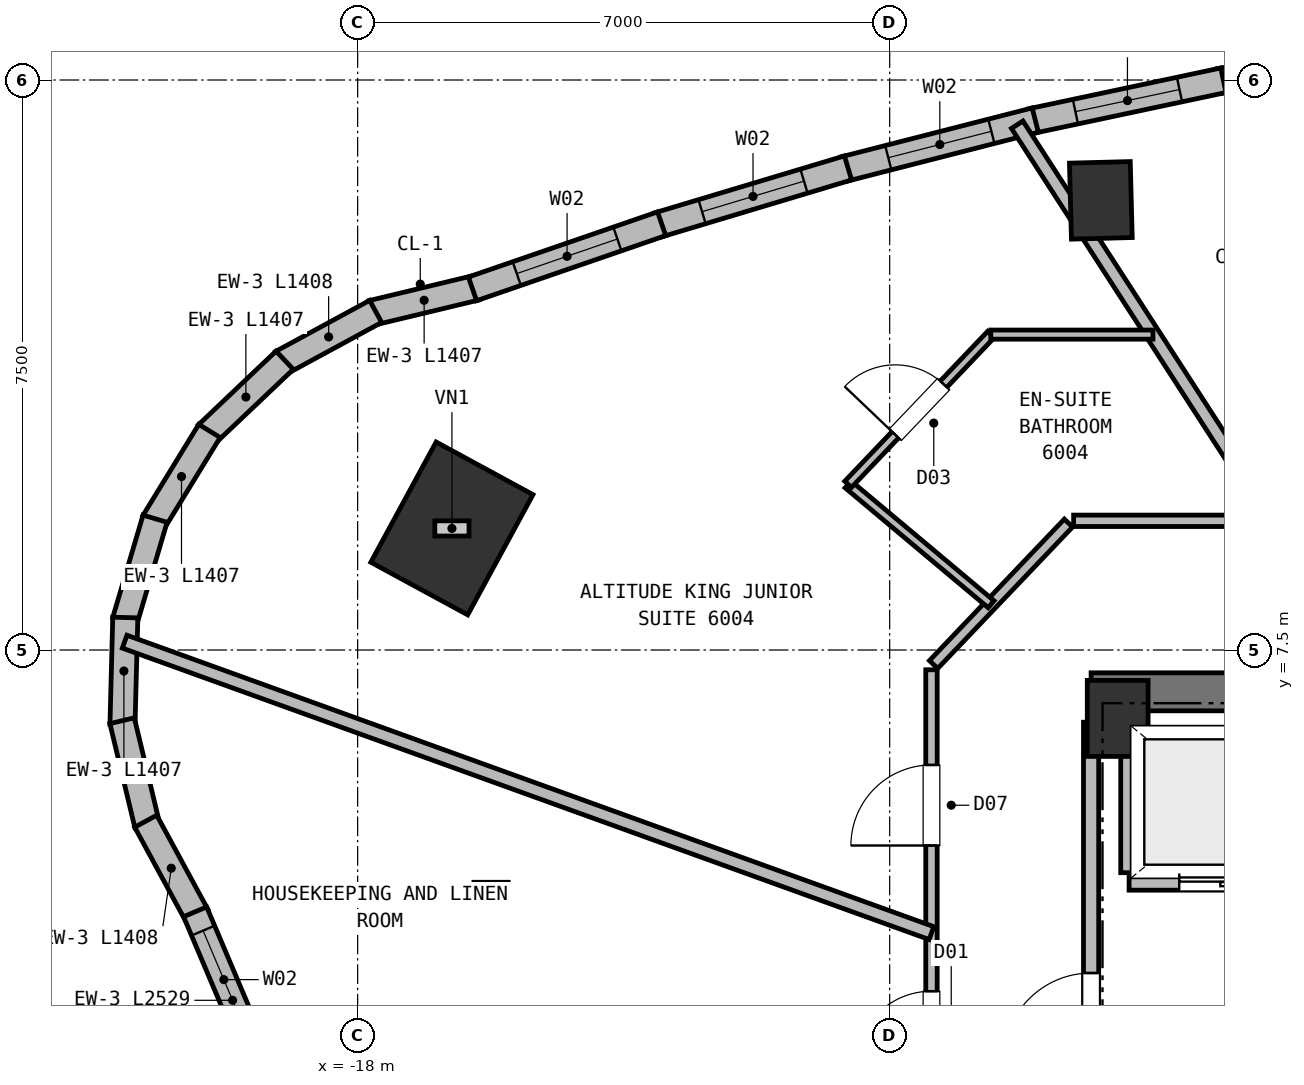
"""IFC4 building model, lengths in metres.
Left out: names, types, materials, properties, quantities, classifications, styles, units other than length and angle.
Written with IfcOpenShell. Run it as: python <this file> out.ifc"""

import sys

from ifc_helpers import new_model, si_unit, direction, frame, frame_2d, origin, origin_2d, place, context, subcontext, project, spatial, rectangle, extrude, element, fill, save


model = new_model("IFC4")
c1 = context("Model", 3, precision=1e-05, world=origin(), true_north=direction((0.0, 1.0)))
c2 = subcontext(c1, "Body", "Model", "MODEL_VIEW")
j1 = project(units=[si_unit("LENGTHUNIT", "METRE"), si_unit("PLANEANGLEUNIT", "RADIAN")], contexts=[c1])
p1 = place(None, origin())
s1 = spatial("IfcSite", under=j1, at=p1, CompositionType="ELEMENT")
p2 = place(p1, origin())
s2 = spatial("IfcBuilding", under=s1, at=p2, CompositionType="ELEMENT")
p3 = place(p2, frame((0.0, 0.0, 228.35)))
s3 = spatial("IfcBuildingStorey", under=s2, at=p3, CompositionType="ELEMENT", Elevation=228.35)
p4 = place(p3, frame((-8.0, 6.6, 0.0), z_axis=(0.0, 0.0, 1.0), x_axis=(1.0, 0.0, 0.0)))
e1 = element("IfcColumn", 1, at=p4, inside=s3, PredefinedType="COLUMN", context=c2, shape_type="SweptSolid", body=[
    extrude(rectangle(XDim=0.8, YDim=1.0, at=origin_2d()), origin(), (0.0, 0.0, 1.0), 3.8),
])
p5 = place(p3, frame((-8.35, 6.95, 0.0), z_axis=(0.0, 0.0, 1.0), x_axis=(1.0, 0.0, 0.0)))
e2 = element("IfcWall", 2, at=p5, inside=s3, PredefinedType="SHEAR", context=c2, shape_type="SweptSolid", body=[
    extrude(rectangle(XDim=16.7, YDim=0.5, at=frame_2d((8.35, 0.0))), origin(), (0.0, 0.0, 1.0), 3.55),
])
p6 = place(p3, frame((-16.76, 9.1, 0.0), z_axis=(0.0, 0.0, 1.0), x_axis=(-0.878817112662, 0.47715876026, 0.0)))
e3 = element("IfcColumn", 3, at=p6, inside=s3, PredefinedType="COLUMN", context=c2, shape_type="SweptSolid", body=[
    extrude(rectangle(XDim=1.45, YDim=1.8, at=origin_2d()), origin(), (0.0, 0.0, 1.0), 3.8),
])
p7 = place(p3, frame((-8.222, 13.417, 0.0), z_axis=(0.0, 0.0, 1.0), x_axis=(0.999657324976, 0.026176948308, 0.0)))
e4 = element("IfcColumn", 4, at=p7, inside=s3, PredefinedType="COLUMN", context=c2, shape_type="SweptSolid", body=[
    extrude(rectangle(XDim=0.8, YDim=1.0, at=origin_2d()), origin(), (0.0, 0.0, 1.0), 3.8),
])
p8 = place(p3, frame((-17.809, 11.938, 0.0), z_axis=(0.0, 0.0, 1.0), x_axis=(0.972355799013, 0.23350417582, 0.0)))
e5 = element("IfcWall", 5, at=p8, inside=s3, PredefinedType="SOLIDWALL", context=c2, shape_type="SweptSolid", body=[
    extrude(rectangle(XDim=1.407, YDim=0.33, at=frame_2d((0.704, 0.0))), origin(), (0.0, 0.0, 1.0), 3.55),
])
p9 = place(p3, frame((-19.0, 11.284, 0.0), z_axis=(0.0, 0.0, 1.0), x_axis=(0.8789012206, 0.47700382014, 0.0)))
e6 = element("IfcWall", 6, at=p9, inside=s3, PredefinedType="SOLIDWALL", context=c2, shape_type="SweptSolid", body=[
    extrude(rectangle(XDim=1.407, YDim=0.33, at=frame_2d((0.704, 0.0))), origin(), (0.0, 0.0, 1.0), 3.55),
])
for number, where, z_axis, x_axis in (
    (7, (-19.981, 10.344, 0.0), (0.0, 0.0, 1.0), (0.725, 0.688, 0.0)),
    (8, (-20.685, 9.183, 0.0), (0.0, 0.0, 1.0), (0.523, 0.853, 0.0)),
):
    element("IfcWall", number, at=place(p3, frame(where, z_axis=z_axis, x_axis=x_axis)), inside=s3, PredefinedType="SOLIDWALL", context=c2, shape_type="SweptSolid", body=[
        extrude(rectangle(XDim=1.407, YDim=0.33, at=frame_2d((0.704, 0.0))), origin(), (0.0, 0.0, 1.0), 3.55),
    ])
p10 = place(p3, frame((-21.065, 7.878, 0.0), z_axis=(0.0, 0.0, 1.0), x_axis=(0.284100140437, 0.958794613149, 0.0)))
e9 = element("IfcWall", 9, at=p10, inside=s3, PredefinedType="SOLIDWALL", context=c2, shape_type="SweptSolid", body=[
    extrude(rectangle(XDim=1.408, YDim=0.33, at=frame_2d((0.704, 0.0))), origin(), (0.0, 0.0, 1.0), 3.55),
])
for number, where, z_axis, x_axis in (
    (10, (-21.094, 6.52, 0.0), (0.0, 0.0, 1.0), (0.026, 1.0, 0.0)),
    (11, (-20.77, 5.201, 0.0), (0.0, 0.0, 1.0), (-0.233, 0.972, 0.0)),
):
    element("IfcWall", number, at=place(p3, frame(where, z_axis=z_axis, x_axis=x_axis)), inside=s3, PredefinedType="SOLIDWALL", context=c2, shape_type="SweptSolid", body=[
        extrude(rectangle(XDim=1.407, YDim=0.33, at=frame_2d((0.704, 0.0))), origin(), (0.0, 0.0, 1.0), 3.55),
    ])
p11 = place(p3, frame((-20.116, 4.01, 0.0), z_axis=(0.0, 0.0, 1.0), x_axis=(-0.477137792558, 0.878828496871, 0.0)))
e12 = element("IfcWall", 12, at=p11, inside=s3, PredefinedType="SOLIDWALL", context=c2, shape_type="SweptSolid", body=[
    extrude(rectangle(XDim=1.408, YDim=0.33, at=frame_2d((0.704, 0.0))), origin(), (0.0, 0.0, 1.0), 3.55),
])
p12 = place(p3, frame((-19.152, 1.727, 0.0), z_axis=(0.0, 0.0, 1.0), x_axis=(-0.390140710462, 0.920755247631, 0.0)))
e13 = element("IfcWall", 13, at=p12, inside=s3, PredefinedType="SOLIDWALL", context=c2, shape_type="SweptSolid", body=[
    extrude(rectangle(XDim=2.529, YDim=0.33, at=frame_2d((1.264, 0.0))), origin(), (0.0, 0.0, 1.0), 3.55),
])
p13 = place(p12, frame((0.86, 0.0, 0.72)))
e14 = element("IfcOpeningElement", 14, at=p13, cuts=e13, PredefinedType="OPENING", context=c2, shape_type="SweptSolid", body=[
    extrude(rectangle(XDim=1.4, YDim=1.84, at=frame_2d((0.7, 0.92))), frame((0.0, 0.175, 0.0), z_axis=(0.0, -1.0, 0.0), x_axis=(1.0, 0.0, 0.0)), (0.0, 0.0, 1.0), 0.35),
])
p14 = place(p3, frame((-6.659, 14.988, 0.0), z_axis=(0.0, 0.0, 1.0), x_axis=(0.985993143287, 0.16678585489, 0.0)))
e15 = element("IfcWall", 15, at=p14, inside=s3, PredefinedType="SOLIDWALL", context=c2, shape_type="SweptSolid", body=[
    extrude(rectangle(XDim=2.57, YDim=0.33, at=frame_2d((1.285, 0.0))), origin(), (0.0, 0.0, 1.0), 3.55),
])
p15 = place(p14, frame((0.585, 0.0, 0.72)))
e16 = element("IfcOpeningElement", 16, at=p15, cuts=e15, PredefinedType="OPENING", context=c2, shape_type="SweptSolid", body=[
    extrude(rectangle(XDim=1.4, YDim=1.84, at=frame_2d((0.7, 0.92))), frame((0.0, 0.175, 0.0), z_axis=(0.0, -1.0, 0.0), x_axis=(1.0, 0.0, 0.0)), (0.0, 0.0, 1.0), 0.35),
])
p16 = place(p3, frame((-9.133, 14.461, 0.0), z_axis=(0.0, 0.0, 1.0), x_axis=(0.978200927103, 0.207660651579, 0.0)))
e17 = element("IfcWall", 17, at=p16, inside=s3, PredefinedType="SOLIDWALL", context=c2, shape_type="SweptSolid", body=[
    extrude(rectangle(XDim=2.579, YDim=0.33, at=frame_2d((1.29, 0.0))), origin(), (0.0, 0.0, 1.0), 3.55),
])
p17 = place(p16, frame((0.59, 0.0, 0.72)))
e18 = element("IfcOpeningElement", 18, at=p17, cuts=e17, PredefinedType="OPENING", context=c2, shape_type="SweptSolid", body=[
    extrude(rectangle(XDim=1.4, YDim=1.84, at=frame_2d((0.7, 0.92))), frame((0.0, 0.175, 0.0), z_axis=(0.0, -1.0, 0.0), x_axis=(1.0, 0.0, 0.0)), (0.0, 0.0, 1.0), 0.35),
])
p18 = place(p3, frame((-11.596, 13.83, 0.0), z_axis=(0.0, 0.0, 1.0), x_axis=(0.968775883115, 0.247938073507, 0.0)))
e19 = element("IfcWall", 19, at=p18, inside=s3, PredefinedType="SOLIDWALL", context=c2, shape_type="SweptSolid", body=[
    extrude(rectangle(XDim=2.593, YDim=0.33, at=frame_2d((1.296, 0.0))), origin(), (0.0, 0.0, 1.0), 3.55),
])
p19 = place(p18, frame((0.596, 0.0, 0.72)))
e20 = element("IfcOpeningElement", 20, at=p19, cuts=e19, PredefinedType="OPENING", context=c2, shape_type="SweptSolid", body=[
    extrude(rectangle(XDim=1.4, YDim=1.84, at=frame_2d((0.7, 0.92))), frame((0.0, 0.175, 0.0), z_axis=(0.0, -1.0, 0.0), x_axis=(1.0, 0.0, 0.0)), (0.0, 0.0, 1.0), 0.35),
])
p20 = place(p3, frame((-14.048, 13.094, 0.0), z_axis=(0.0, 0.0, 1.0), x_axis=(0.957870045739, 0.287201976796, 0.0)))
e21 = element("IfcWall", 21, at=p20, inside=s3, PredefinedType="SOLIDWALL", context=c2, shape_type="SweptSolid", body=[
    extrude(rectangle(XDim=2.61, YDim=0.33, at=frame_2d((1.305, 0.0))), origin(), (0.0, 0.0, 1.0), 3.55),
])
p21 = place(p20, frame((0.605, 0.0, 0.72)))
e22 = element("IfcOpeningElement", 22, at=p21, cuts=e21, PredefinedType="OPENING", context=c2, shape_type="SweptSolid", body=[
    extrude(rectangle(XDim=1.4, YDim=1.84, at=frame_2d((0.7, 0.92))), frame((0.0, 0.175, 0.0), z_axis=(0.0, -1.0, 0.0), x_axis=(1.0, 0.0, 0.0)), (0.0, 0.0, 1.0), 0.35),
])
p22 = place(p3, frame((-16.489, 12.252, 0.0), z_axis=(0.0, 0.0, 1.0), x_axis=(0.945558180725, 0.325453110085, 0.0)))
e23 = element("IfcWall", 23, at=p22, inside=s3, PredefinedType="SOLIDWALL", context=c2, shape_type="SweptSolid", body=[
    extrude(rectangle(XDim=2.632, YDim=0.33, at=frame_2d((1.316, 0.0))), origin(), (0.0, 0.0, 1.0), 3.55),
])
p23 = place(p22, frame((0.616, 0.0, 0.72)))
e24 = element("IfcOpeningElement", 24, at=p23, cuts=e23, PredefinedType="OPENING", context=c2, shape_type="SweptSolid", body=[
    extrude(rectangle(XDim=1.4, YDim=1.84, at=frame_2d((0.7, 0.92))), frame((0.0, 0.175, 0.0), z_axis=(0.0, -1.0, 0.0), x_axis=(1.0, 0.0, 0.0)), (0.0, 0.0, 1.0), 0.35),
])
p24 = place(p3, frame((-7.85, 4.45, 0.0), z_axis=(0.0, 0.0, 1.0), x_axis=(1.0, 0.0, 0.0)))
e25 = element("IfcWall", 25, at=p24, inside=s3, PredefinedType="PARTITIONING", context=c2, shape_type="SweptSolid", body=[
    extrude(rectangle(XDim=2.5, YDim=0.22, at=frame_2d((1.25, 0.0))), origin(), (0.0, 0.0, 1.0), 3.55),
])
p25 = place(p24, frame((0.66, 0.0, 0.0)))
e26 = element("IfcOpeningElement", 26, at=p25, cuts=e25, PredefinedType="OPENING", context=c2, shape_type="SweptSolid", body=[
    extrude(rectangle(XDim=1.18, YDim=2.15, at=frame_2d((0.59, 1.075))), frame((0.0, 0.12, 0.0), z_axis=(0.0, -1.0, 0.0), x_axis=(1.0, 0.0, 0.0)), (0.0, 0.0, 1.0), 0.24),
])
p26 = place(p3, frame((-7.85, 4.57, 0.0), z_axis=(0.0, 0.0, 1.0), x_axis=(0.0, 1.0, 0.0)))
e27 = element("IfcWall", 27, at=p26, inside=s3, PredefinedType="PARTITIONING", context=c2, shape_type="SweptSolid", body=[
    extrude(rectangle(XDim=2.13, YDim=0.22, at=frame_2d((1.065, 0.0))), origin(), (0.0, 0.0, 1.0), 3.18),
])
p27 = place(p3, frame((-8.35, 1.15, 0.0), z_axis=(0.0, 0.0, 1.0), x_axis=(0.0, 1.0, 0.0)))
e28 = element("IfcWall", 28, at=p27, inside=s3, PredefinedType="PARTITIONING", context=c2, shape_type="SweptSolid", body=[
    extrude(rectangle(XDim=5.4, YDim=0.2, at=frame_2d((2.7, 0.0))), origin(), (0.0, 0.0, 1.0), 3.55),
])
p28 = place(p27, frame((0.95, 0.0, 0.0)))
e29 = element("IfcOpeningElement", 29, at=p28, cuts=e28, PredefinedType="OPENING", context=c2, shape_type="SweptSolid", body=[
    extrude(rectangle(XDim=1.15, YDim=2.15, at=frame_2d((0.575, 1.075))), frame((0.0, 0.11, 0.0), z_axis=(0.0, -1.0, 0.0), x_axis=(1.0, 0.0, 0.0)), (0.0, 0.0, 1.0), 0.22),
])
p29 = place(p3, frame((-8.58, 9.2, 0.0), z_axis=(0.0, 0.0, 1.0), x_axis=(1.0, 0.0, 0.0)))
e30 = element("IfcWall", 30, at=p29, inside=s3, PredefinedType="PARTITIONING", context=c2, shape_type="SweptSolid", body=[
    extrude(rectangle(XDim=17.16, YDim=0.15, at=frame_2d((8.58, 0.0))), origin(), (0.0, 0.0, 1.0), 3.55),
])
p30 = place(p29, frame((4.89, 0.0, 0.0)))
e31 = element("IfcOpeningElement", 31, at=p30, cuts=e30, PredefinedType="OPENING", context=c2, shape_type="SweptSolid", body=[
    extrude(rectangle(XDim=1.0, YDim=2.15, at=frame_2d((0.5, 1.075))), frame((0.0, 0.085, 0.0), z_axis=(0.0, -1.0, 0.0), x_axis=(1.0, 0.0, 0.0)), (0.0, 0.0, 1.0), 0.17),
])
p31 = place(p29, frame((11.016, 0.0, 0.0)))
e32 = element("IfcOpeningElement", 32, at=p31, cuts=e30, PredefinedType="OPENING", context=c2, shape_type="SweptSolid", body=[
    extrude(rectangle(XDim=1.0, YDim=2.15, at=frame_2d((0.5, 1.075))), frame((0.0, 0.085, 0.0), z_axis=(0.0, -1.0, 0.0), x_axis=(1.0, 0.0, 0.0)), (0.0, 0.0, 1.0), 0.17),
])
p32 = place(p3, frame((-10.422, 7.309, 0.0), z_axis=(0.0, 0.0, 1.0), x_axis=(0.689960858356, 0.723846678473, 0.0)))
e33 = element("IfcWall", 33, at=p32, inside=s3, PredefinedType="PARTITIONING", context=c2, shape_type="SweptSolid", body=[
    extrude(rectangle(XDim=2.572, YDim=0.15, at=frame_2d((1.286, 0.0))), origin(), (0.0, 0.0, 1.0), 3.55),
])
p33 = place(p3, frame((-10.45, -7.24, 0.0), z_axis=(0.0, 0.0, 1.0), x_axis=(0.0, 1.0, 0.0)))
e34 = element("IfcWall", 34, at=p33, inside=s3, PredefinedType="PARTITIONING", context=c2, shape_type="SweptSolid", body=[
    extrude(rectangle(XDim=14.48, YDim=0.15, at=frame_2d((7.24, 0.0))), origin(), (0.0, 0.0, 1.0), 3.23),
])
p34 = place(p33, frame((6.7, 0.0, 0.0)))
e35 = element("IfcOpeningElement", 35, at=p34, cuts=e34, PredefinedType="OPENING", context=c2, shape_type="SweptSolid", body=[
    extrude(rectangle(XDim=0.95, YDim=2.1, at=frame_2d((0.475, 1.05))), frame((0.0, 0.085, 0.0), z_axis=(0.0, -1.0, 0.0), x_axis=(1.0, 0.0, 0.0)), (0.0, 0.0, 1.0), 0.17),
])
p35 = place(p33, frame((9.251, 0.0, 0.0)))
e36 = element("IfcOpeningElement", 36, at=p35, cuts=e34, PredefinedType="OPENING", context=c2, shape_type="SweptSolid", body=[
    extrude(rectangle(XDim=1.0, YDim=2.15, at=frame_2d((0.5, 1.075))), frame((0.0, 0.085, 0.0), z_axis=(0.0, -1.0, 0.0), x_axis=(1.0, 0.0, 0.0)), (0.0, 0.0, 1.0), 0.17),
])
p36 = place(p33, frame((2.577, 0.0, 0.0)))
e37 = element("IfcOpeningElement", 37, at=p36, cuts=e34, PredefinedType="OPENING", context=c2, shape_type="SweptSolid", body=[
    extrude(rectangle(XDim=1.0, YDim=2.15, at=frame_2d((0.5, 1.075))), frame((0.0, 0.085, 0.0), z_axis=(0.0, -1.0, 0.0), x_axis=(1.0, 0.0, 0.0)), (0.0, 0.0, 1.0), 0.17),
])
p37 = place(p33, frame((12.167, 0.0, 0.0)))
e38 = element("IfcOpeningElement", 38, at=p37, cuts=e34, PredefinedType="OPENING", context=c2, shape_type="SweptSolid", body=[
    extrude(rectangle(XDim=1.06, YDim=2.15, at=frame_2d((0.53, 1.075))), frame((0.0, 0.085, 0.0), z_axis=(0.0, -1.0, 0.0), x_axis=(1.0, 0.0, 0.0)), (0.0, 0.0, 1.0), 0.17),
])
p38 = place(p3, frame((-5.951, 9.2, 0.0), z_axis=(0.0, 0.0, 1.0), x_axis=(-0.543119167899, 0.839655625516, 0.0)))
e39 = element("IfcWall", 39, at=p38, inside=s3, PredefinedType="PARTITIONING", context=c2, shape_type="SweptSolid", body=[
    extrude(rectangle(XDim=6.207, YDim=0.18, at=frame_2d((3.104, 0.0))), origin(), (0.0, 0.0, 1.0), 3.55),
])
p39 = place(p3, frame((-9.666, 8.103, 0.0), z_axis=(0.0, 0.0, 1.0), x_axis=(-0.766392114791, 0.64237304301, 0.0)))
e40 = element("IfcWall", 40, at=p39, inside=s3, PredefinedType="PARTITIONING", context=c2, shape_type="SweptSolid", body=[
    extrude(rectangle(XDim=2.455, YDim=0.12, at=frame_2d((1.228, 0.0))), origin(), (0.0, 0.0, 1.0), 3.55),
])
p40 = place(p3, frame((-11.547, 9.68, 0.0), z_axis=(0.0, 0.0, 1.0), x_axis=(0.689950763689, 0.723856300438, 0.0)))
e41 = element("IfcWall", 41, at=p40, inside=s3, PredefinedType="PARTITIONING", context=c2, shape_type="SweptSolid", body=[
    extrude(rectangle(XDim=2.722, YDim=0.12, at=frame_2d((1.361, 0.0))), origin(), (0.0, 0.0, 1.0), 3.55),
])
p41 = place(p40, frame((0.901, 0.0, 0.0)))
e42 = element("IfcOpeningElement", 42, at=p41, cuts=e41, PredefinedType="OPENING", context=c2, shape_type="SweptSolid", body=[
    extrude(rectangle(XDim=0.92, YDim=2.1, at=frame_2d((0.46, 1.05))), frame((0.0, 0.07, 0.0), z_axis=(0.0, -1.0, 0.0), x_axis=(1.0, 0.0, 0.0)), (0.0, 0.0, 1.0), 0.14),
])
p42 = place(p3, frame((-7.536, 11.65, 0.0), z_axis=(0.0, 0.0, 1.0), x_axis=(-1.0, 0.0, 0.0)))
e43 = element("IfcWall", 43, at=p42, inside=s3, PredefinedType="PARTITIONING", context=c2, shape_type="SweptSolid", body=[
    extrude(rectangle(XDim=2.134, YDim=0.12, at=frame_2d((1.067, 0.0))), origin(), (0.0, 0.0, 1.0), 3.55),
])
p43 = place(p3, frame((-10.45, 3.775, 0.0), z_axis=(0.0, 0.0, 1.0), x_axis=(-0.9405132002, 0.339757148931, 0.0)))
e44 = element("IfcWall", 44, at=p43, inside=s3, PredefinedType="PARTITIONING", context=c2, shape_type="SweptSolid", body=[
    extrude(rectangle(XDim=11.287, YDim=0.18, at=frame_2d((5.643, 0.0))), origin(), (0.0, 0.0, 1.0), 3.55),
])
p44 = place(p13, origin())
e45 = element("IfcWindow", 45, at=p44, inside=s3, PartitioningType="SINGLE_PANEL", PredefinedType="WINDOW", context=c2, shape_type="SweptSolid", body=[
    extrude(rectangle(XDim=1.4, YDim=1.84, at=frame_2d((0.7, 0.92))), frame((0.0, 0.03, 0.0), z_axis=(0.0, -1.0, 0.0), x_axis=(1.0, 0.0, 0.0)), (0.0, 0.0, 1.0), 0.06),
])
fill(e14, e45)
p45 = place(p17, origin())
e46 = element("IfcWindow", 46, at=p45, inside=s3, PartitioningType="SINGLE_PANEL", PredefinedType="WINDOW", context=c2, shape_type="SweptSolid", body=[
    extrude(rectangle(XDim=1.4, YDim=1.84, at=frame_2d((0.7, 0.92))), frame((0.0, 0.03, 0.0), z_axis=(0.0, -1.0, 0.0), x_axis=(1.0, 0.0, 0.0)), (0.0, 0.0, 1.0), 0.06),
])
fill(e18, e46)
p46 = place(p19, origin())
e47 = element("IfcWindow", 47, at=p46, inside=s3, PartitioningType="SINGLE_PANEL", PredefinedType="WINDOW", context=c2, shape_type="SweptSolid", body=[
    extrude(rectangle(XDim=1.4, YDim=1.84, at=frame_2d((0.7, 0.92))), frame((0.0, 0.03, 0.0), z_axis=(0.0, -1.0, 0.0), x_axis=(1.0, 0.0, 0.0)), (0.0, 0.0, 1.0), 0.06),
])
fill(e20, e47)
p47 = place(p21, origin())
e48 = element("IfcWindow", 48, at=p47, inside=s3, PartitioningType="SINGLE_PANEL", PredefinedType="WINDOW", context=c2, shape_type="SweptSolid", body=[
    extrude(rectangle(XDim=1.4, YDim=1.84, at=frame_2d((0.7, 0.92))), frame((0.0, 0.03, 0.0), z_axis=(0.0, -1.0, 0.0), x_axis=(1.0, 0.0, 0.0)), (0.0, 0.0, 1.0), 0.06),
])
fill(e22, e48)
p48 = place(p23, origin())
e49 = element("IfcWindow", 49, at=p48, inside=s3, PartitioningType="SINGLE_PANEL", PredefinedType="WINDOW", context=c2, shape_type="SweptSolid", body=[
    extrude(rectangle(XDim=1.4, YDim=1.84, at=frame_2d((0.7, 0.92))), frame((0.0, 0.03, 0.0), z_axis=(0.0, -1.0, 0.0), x_axis=(1.0, 0.0, 0.0)), (0.0, 0.0, 1.0), 0.06),
])
fill(e24, e49)
p49 = place(p25, origin())
e50 = element("IfcDoor", 50, at=p49, inside=s3, OperationType="DOUBLE_DOOR_SLIDING", PredefinedType="DOOR", context=c2, shape_type="SweptSolid", body=[
    extrude(rectangle(XDim=1.18, YDim=2.15, at=frame_2d((0.59, 1.075))), frame((0.0, 0.025, 0.0), z_axis=(0.0, -1.0, 0.0), x_axis=(1.0, 0.0, 0.0)), (0.0, 0.0, 1.0), 0.05),
])
fill(e26, e50)
p50 = place(p28, origin())
e51 = element("IfcDoor", 51, at=p50, inside=s3, OperationType="SINGLE_SWING_LEFT", PredefinedType="DOOR", context=c2, shape_type="SweptSolid", body=[
    extrude(rectangle(XDim=1.15, YDim=2.15, at=frame_2d((0.575, 1.075))), frame((0.0, 0.025, 0.0), z_axis=(0.0, -1.0, 0.0), x_axis=(1.0, 0.0, 0.0)), (0.0, 0.0, 1.0), 0.05),
])
fill(e29, e51)
p51 = place(p41, origin())
e52 = element("IfcDoor", 52, at=p51, inside=s3, OperationType="SINGLE_SWING_LEFT", PredefinedType="DOOR", context=c2, shape_type="SweptSolid", body=[
    extrude(rectangle(XDim=0.92, YDim=2.1, at=frame_2d((0.46, 1.05))), frame((0.0, 0.025, 0.0), z_axis=(0.0, -1.0, 0.0), x_axis=(1.0, 0.0, 0.0)), (0.0, 0.0, 1.0), 0.05),
])
fill(e42, e52)
p52 = place(p35, origin())
e53 = element("IfcDoor", 53, at=p52, inside=s3, OperationType="SINGLE_SWING_LEFT", PredefinedType="DOOR", context=c2, shape_type="SweptSolid", body=[
    extrude(rectangle(XDim=1.0, YDim=2.15, at=frame_2d((0.5, 1.075))), frame((0.0, 0.025, 0.0), z_axis=(0.0, -1.0, 0.0), x_axis=(1.0, 0.0, 0.0)), (0.0, 0.0, 1.0), 0.05),
])
fill(e36, e53)
p53 = place(p37, origin())
e54 = element("IfcDoor", 54, at=p53, inside=s3, OperationType="SINGLE_SWING_LEFT", PredefinedType="DOOR", context=c2, shape_type="SweptSolid", body=[
    extrude(rectangle(XDim=1.06, YDim=2.15, at=frame_2d((0.53, 1.075))), frame((0.0, 0.025, 0.0), z_axis=(0.0, -1.0, 0.0), x_axis=(1.0, 0.0, 0.0)), (0.0, 0.0, 1.0), 0.05),
])
fill(e38, e54)
save(model, sys.argv[1])
